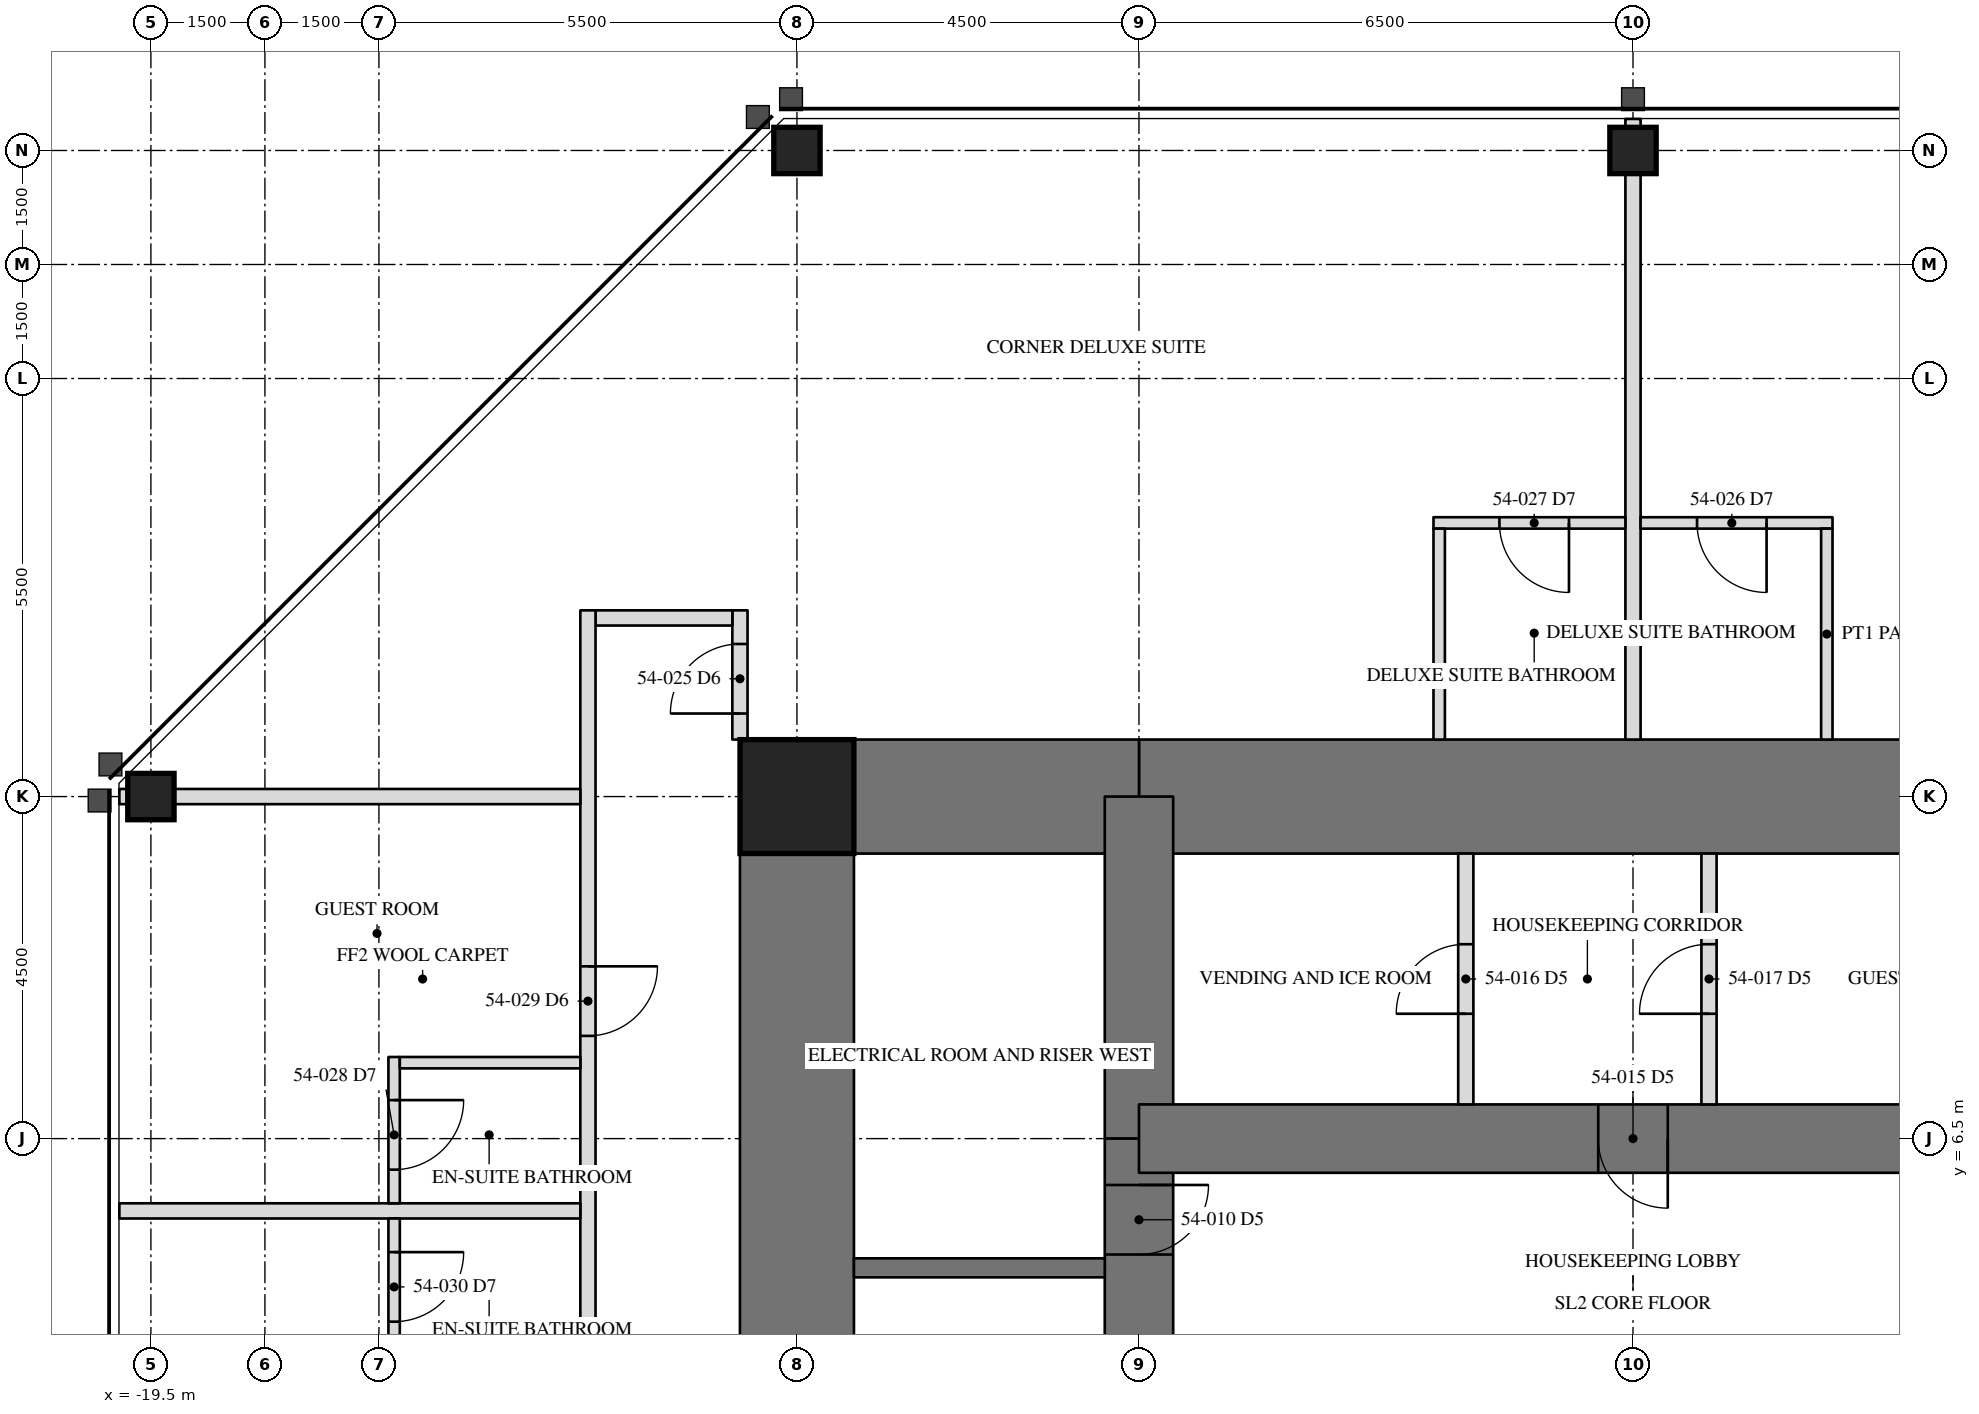
"""IFC4 building model, lengths in metres.
Left out: names, types, materials, properties, quantities, classifications, styles, units other than length and angle.
Written with IfcOpenShell. Run it as: python <this file> out.ifc"""

import sys

from ifc_helpers import new_model, si_unit, direction, frame, frame_2d, origin, origin_2d, place, context, subcontext, project, spatial, rectangle, hollow_rectangle, extrude, element, fill, save


model = new_model("IFC4")
c1 = context("Model", 3, precision=1e-05, world=origin(), true_north=direction((0.0, 1.0)))
c2 = subcontext(c1, "Body", "Model", "MODEL_VIEW")
j1 = project(units=[si_unit("LENGTHUNIT", "METRE"), si_unit("PLANEANGLEUNIT", "RADIAN")], contexts=[c1])
p1 = place(None, origin())
s1 = spatial("IfcSite", under=j1, at=p1, CompositionType="ELEMENT")
p2 = place(p1, origin())
s2 = spatial("IfcBuilding", under=s1, at=p2, CompositionType="ELEMENT")
p3 = place(p2, frame((0.0, 0.0, 225.7)))
s3 = spatial("IfcBuildingStorey", under=s2, at=p3, CompositionType="ELEMENT", Elevation=225.7)
for number, where, z_axis, x_axis in (
    (1, (0.0, 19.5, 0.0), (0.0, 0.0, 1.0), (1.0, 0.0, 0.0)),
    (2, (-11.0, 19.5, 0.0), (0.0, 0.0, 1.0), (1.0, 0.0, 0.0)),
    (3, (-19.5, 11.0, 0.0), (0.0, 0.0, 1.0), (0.0, 1.0, 0.0)),
):
    element("IfcColumn", number, at=place(p3, frame(where, z_axis=z_axis, x_axis=x_axis)), inside=s3, PredefinedType="COLUMN", context=c2, shape_type="SweptSolid", body=[
        extrude(hollow_rectangle(XDim=0.61, YDim=0.61, WallThickness=0.076, at=origin_2d()), origin(), (0.0, 0.0, 1.0), 3.5),
    ])
p4 = place(p3, frame((-11.0, 11.0, 0.0), z_axis=(0.0, 0.0, 1.0), x_axis=(0.0, -1.0, 0.0)))
e4 = element("IfcWall", 4, at=p4, inside=s3, PredefinedType="SHEAR", context=c2, shape_type="SweptSolid", body=[
    extrude(rectangle(XDim=22.0, YDim=1.5, at=frame_2d((11.0, 0.0))), origin(), (0.0, 0.0, 1.0), 3.5),
])
p5 = place(p4, frame((15.393, 0.0, 0.0)))
e5 = element("IfcOpeningElement", 5, at=p5, cuts=e4, PredefinedType="OPENING", context=c2, shape_type="SweptSolid", body=[
    extrude(rectangle(XDim=0.915, YDim=2.134, at=frame_2d((0.458, 1.067))), frame((0.0, 0.76, 0.0), z_axis=(0.0, -1.0, 0.0), x_axis=(1.0, 0.0, 0.0)), (0.0, 0.0, 1.0), 1.52),
])
p6 = place(p3, frame((6.5, 11.0, 0.0), z_axis=(0.0, 0.0, 1.0), x_axis=(-1.0, 0.0, 0.0)))
e6 = element("IfcWall", 6, at=p6, inside=s3, PredefinedType="SHEAR", context=c2, shape_type="SweptSolid", body=[
    extrude(rectangle(XDim=13.0, YDim=1.5, at=frame_2d((6.5, 0.0))), origin(), (0.0, 0.0, 1.0), 3.5),
])
p7 = place(p3, frame((-6.5, 11.0, 0.0), z_axis=(0.0, 0.0, 1.0), x_axis=(-1.0, 0.0, 0.0)))
e7 = element("IfcWall", 7, at=p7, inside=s3, PredefinedType="SHEAR", context=c2, shape_type="SweptSolid", body=[
    extrude(rectangle(XDim=4.5, YDim=1.5, at=frame_2d((2.25, 0.0))), origin(), (0.0, 0.0, 1.0), 3.5),
])
p8 = place(p3, frame((-6.5, 11.0, 0.0), z_axis=(0.0, 0.0, 1.0), x_axis=(0.0, -1.0, 0.0)))
e8 = element("IfcWall", 8, at=p8, inside=s3, PredefinedType="SHEAR", context=c2, shape_type="SweptSolid", body=[
    extrude(rectangle(XDim=4.5, YDim=0.9, at=frame_2d((2.25, 0.0))), origin(), (0.0, 0.0, 1.0), 3.5),
])
p9 = place(p3, frame((-6.5, 6.5, 0.0), z_axis=(0.0, 0.0, 1.0), x_axis=(0.0, -1.0, 0.0)))
e9 = element("IfcWall", 9, at=p9, inside=s3, PredefinedType="SHEAR", context=c2, shape_type="SweptSolid", body=[
    extrude(rectangle(XDim=13.0, YDim=0.9, at=frame_2d((6.5, 0.0))), origin(), (0.0, 0.0, 1.0), 3.5),
])
p10 = place(p9, frame((10.893, 0.0, 0.0)))
e10 = element("IfcOpeningElement", 10, at=p10, cuts=e9, PredefinedType="OPENING", context=c2, shape_type="SweptSolid", body=[
    extrude(rectangle(XDim=0.915, YDim=2.134, at=frame_2d((0.458, 1.067))), frame((0.0, 0.46, 0.0), z_axis=(0.0, -1.0, 0.0), x_axis=(1.0, 0.0, 0.0)), (0.0, 0.0, 1.0), 0.92),
])
p11 = place(p9, frame((0.61, 0.0, 0.0)))
e11 = element("IfcOpeningElement", 11, at=p11, cuts=e9, PredefinedType="OPENING", context=c2, shape_type="SweptSolid", body=[
    extrude(rectangle(XDim=0.915, YDim=2.134, at=frame_2d((0.458, 1.067))), frame((0.0, 0.46, 0.0), z_axis=(0.0, -1.0, 0.0), x_axis=(1.0, 0.0, 0.0)), (0.0, 0.0, 1.0), 0.92),
])
p12 = place(p3, frame((6.5, 6.5, 0.0), z_axis=(0.0, 0.0, 1.0), x_axis=(-1.0, 0.0, 0.0)))
e12 = element("IfcWall", 12, at=p12, inside=s3, PredefinedType="SHEAR", context=c2, shape_type="SweptSolid", body=[
    extrude(rectangle(XDim=13.0, YDim=0.9, at=frame_2d((6.5, 0.0))), origin(), (0.0, 0.0, 1.0), 3.5),
])
p13 = place(p12, frame((6.042, 0.0, 0.0)))
e13 = element("IfcOpeningElement", 13, at=p13, cuts=e12, PredefinedType="OPENING", context=c2, shape_type="SweptSolid", body=[
    extrude(rectangle(XDim=0.915, YDim=2.134, at=frame_2d((0.458, 1.067))), frame((0.0, 0.46, 0.0), z_axis=(0.0, -1.0, 0.0), x_axis=(1.0, 0.0, 0.0)), (0.0, 0.0, 1.0), 0.92),
])
p14 = place(p3, frame((-11.0, 11.0, 0.0), z_axis=(0.0, 0.0, 1.0), x_axis=(1.0, 0.0, 0.0)))
e14 = element("IfcColumn", 14, at=p14, inside=s3, PredefinedType="COLUMN", context=c2, shape_type="SweptSolid", body=[
    extrude(hollow_rectangle(XDim=1.499, YDim=1.499, WallThickness=0.102, at=origin_2d()), origin(), (0.0, 0.0, 1.0), 3.5),
])
p15 = place(p3, frame((-6.95, 4.8, 0.0), z_axis=(0.0, 0.0, 1.0), x_axis=(-1.0, 0.0, 0.0)))
e15 = element("IfcWall", 15, at=p15, inside=s3, PredefinedType="SOLIDWALL", context=c2, shape_type="SweptSolid", body=[
    extrude(rectangle(XDim=3.3, YDim=0.25, at=frame_2d((1.65, 0.0))), origin(), (0.0, 0.0, 1.0), 3.31),
])
p16 = place(p3, frame((-2.2, 6.95, 0.0), z_axis=(0.0, 0.0, 1.0), x_axis=(0.0, 1.0, 0.0)))
e16 = element("IfcWall", 16, at=p16, inside=s3, PredefinedType="PARTITIONING", context=c2, shape_type="SweptSolid", body=[
    extrude(rectangle(XDim=3.3, YDim=0.2, at=frame_2d((1.65, 0.0))), origin(), (0.0, 0.0, 1.0), 3.31),
])
p17 = place(p16, frame((1.192, 0.0, 0.0)))
e17 = element("IfcOpeningElement", 17, at=p17, cuts=e16, PredefinedType="OPENING", context=c2, shape_type="SweptSolid", body=[
    extrude(rectangle(XDim=0.915, YDim=2.134, at=frame_2d((0.458, 1.067))), frame((0.0, 0.11, 0.0), z_axis=(0.0, -1.0, 0.0), x_axis=(1.0, 0.0, 0.0)), (0.0, 0.0, 1.0), 0.22),
])
p18 = place(p3, frame((1.0, 6.95, 0.0), z_axis=(0.0, 0.0, 1.0), x_axis=(0.0, 1.0, 0.0)))
e18 = element("IfcWall", 18, at=p18, inside=s3, PredefinedType="PARTITIONING", context=c2, shape_type="SweptSolid", body=[
    extrude(rectangle(XDim=3.3, YDim=0.2, at=frame_2d((1.65, 0.0))), origin(), (0.0, 0.0, 1.0), 3.31),
])
p19 = place(p18, frame((1.192, 0.0, 0.0)))
e19 = element("IfcOpeningElement", 19, at=p19, cuts=e18, PredefinedType="OPENING", context=c2, shape_type="SweptSolid", body=[
    extrude(rectangle(XDim=0.915, YDim=2.134, at=frame_2d((0.458, 1.067))), frame((0.0, 0.11, 0.0), z_axis=(0.0, -1.0, 0.0), x_axis=(1.0, 0.0, 0.0)), (0.0, 0.0, 1.0), 0.22),
])
p20 = place(p3, frame((-11.75, 11.75, 0.0), z_axis=(0.0, 0.0, 1.0), x_axis=(0.0, 1.0, 0.0)))
e20 = element("IfcWall", 20, at=p20, inside=s3, PredefinedType="PARTITIONING", context=c2, shape_type="SweptSolid", body=[
    extrude(rectangle(XDim=1.7, YDim=0.2, at=frame_2d((0.85, 0.0))), origin(), (0.0, 0.0, 1.0), 3.31),
])
p21 = place(p20, frame((0.343, 0.0, 0.0)))
e21 = element("IfcOpeningElement", 21, at=p21, cuts=e20, PredefinedType="OPENING", context=c2, shape_type="SweptSolid", body=[
    extrude(rectangle(XDim=0.915, YDim=2.134, at=frame_2d((0.458, 1.067))), frame((0.0, 0.11, 0.0), z_axis=(0.0, -1.0, 0.0), x_axis=(1.0, 0.0, 0.0)), (0.0, 0.0, 1.0), 0.22),
])
p22 = place(p3, frame((-11.85, 13.35, 0.0), z_axis=(0.0, 0.0, 1.0), x_axis=(-1.0, 0.0, 0.0)))
e22 = element("IfcWall", 22, at=p22, inside=s3, PredefinedType="PARTITIONING", context=c2, shape_type="SweptSolid", body=[
    extrude(rectangle(XDim=1.8, YDim=0.2, at=frame_2d((0.9, 0.0))), origin(), (0.0, 0.0, 1.0), 3.31),
])
p23 = place(p3, frame((-13.75, 13.45, 0.0), z_axis=(0.0, 0.0, 1.0), x_axis=(0.0, -1.0, 0.0)))
e23 = element("IfcWall", 23, at=p23, inside=s3, PredefinedType="PARTITIONING", context=c2, shape_type="SweptSolid", body=[
    extrude(rectangle(XDim=26.7, YDim=0.2, at=frame_2d((13.35, 0.0))), origin(), (0.0, 0.0, 1.0), 3.31),
])
p24 = place(p23, frame((4.684, 0.0, 0.0)))
e24 = element("IfcOpeningElement", 24, at=p24, cuts=e23, PredefinedType="OPENING", context=c2, shape_type="SweptSolid", body=[
    extrude(rectangle(XDim=0.915, YDim=2.134, at=frame_2d((0.458, 1.067))), frame((0.0, 0.11, 0.0), z_axis=(0.0, -1.0, 0.0), x_axis=(1.0, 0.0, 0.0)), (0.0, 0.0, 1.0), 0.22),
])
p25 = place(p23, frame((10.204, 0.0, 0.0)))
e25 = element("IfcOpeningElement", 25, at=p25, cuts=e23, PredefinedType="OPENING", context=c2, shape_type="SweptSolid", body=[
    extrude(rectangle(XDim=0.915, YDim=2.134, at=frame_2d((0.458, 1.067))), frame((0.0, 0.11, 0.0), z_axis=(0.0, -1.0, 0.0), x_axis=(1.0, 0.0, 0.0)), (0.0, 0.0, 1.0), 0.22),
])
p26 = place(p23, frame((15.846, 0.0, 0.0)))
e26 = element("IfcOpeningElement", 26, at=p26, cuts=e23, PredefinedType="OPENING", context=c2, shape_type="SweptSolid", body=[
    extrude(rectangle(XDim=0.915, YDim=2.134, at=frame_2d((0.458, 1.067))), frame((0.0, 0.11, 0.0), z_axis=(0.0, -1.0, 0.0), x_axis=(1.0, 0.0, 0.0)), (0.0, 0.0, 1.0), 0.22),
])
p27 = place(p23, frame((21.366, 0.0, 0.0)))
e27 = element("IfcOpeningElement", 27, at=p27, cuts=e23, PredefinedType="OPENING", context=c2, shape_type="SweptSolid", body=[
    extrude(rectangle(XDim=0.915, YDim=2.134, at=frame_2d((0.458, 1.067))), frame((0.0, 0.11, 0.0), z_axis=(0.0, -1.0, 0.0), x_axis=(1.0, 0.0, 0.0)), (0.0, 0.0, 1.0), 0.22),
])
p28 = place(p3, frame((0.0, 11.75, 0.0), z_axis=(0.0, 0.0, 1.0), x_axis=(0.0, 1.0, 0.0)))
e28 = element("IfcWall", 28, at=p28, inside=s3, PredefinedType="PARTITIONING", context=c2, shape_type="SweptSolid", body=[
    extrude(rectangle(XDim=8.165, YDim=0.2, at=frame_2d((4.083, 0.0))), origin(), (0.0, 0.0, 1.0), 2.802),
])
p29 = place(p3, frame((2.625, 14.6, 0.0), z_axis=(0.0, 0.0, 1.0), x_axis=(-1.0, 0.0, 0.0)))
e29 = element("IfcWall", 29, at=p29, inside=s3, PredefinedType="PARTITIONING", context=c2, shape_type="SweptSolid", body=[
    extrude(rectangle(XDim=2.525, YDim=0.15, at=frame_2d((1.262, 0.0))), origin(), (0.0, 0.0, 1.0), 3.31),
])
p30 = place(p29, frame((0.867, 0.0, 0.0)))
e30 = element("IfcOpeningElement", 30, at=p30, cuts=e29, PredefinedType="OPENING", context=c2, shape_type="SweptSolid", body=[
    extrude(rectangle(XDim=0.915, YDim=2.032, at=frame_2d((0.458, 1.016))), frame((0.0, 0.085, 0.0), z_axis=(0.0, -1.0, 0.0), x_axis=(1.0, 0.0, 0.0)), (0.0, 0.0, 1.0), 0.17),
])
p31 = place(p3, frame((2.55, 11.75, 0.0), z_axis=(0.0, 0.0, 1.0), x_axis=(0.0, 1.0, 0.0)))
e31 = element("IfcWall", 31, at=p31, inside=s3, PredefinedType="PARTITIONING", context=c2, shape_type="SweptSolid", body=[
    extrude(rectangle(XDim=2.775, YDim=0.15, at=frame_2d((1.387, 0.0))), origin(), (0.0, 0.0, 1.0), 3.31),
])
p32 = place(p3, frame((-0.1, 14.6, 0.0), z_axis=(0.0, 0.0, 1.0), x_axis=(-1.0, 0.0, 0.0)))
e32 = element("IfcWall", 32, at=p32, inside=s3, PredefinedType="PARTITIONING", context=c2, shape_type="SweptSolid", body=[
    extrude(rectangle(XDim=2.525, YDim=0.15, at=frame_2d((1.262, 0.0))), origin(), (0.0, 0.0, 1.0), 3.31),
])
p33 = place(p32, frame((0.742, 0.0, 0.0)))
e33 = element("IfcOpeningElement", 33, at=p33, cuts=e32, PredefinedType="OPENING", context=c2, shape_type="SweptSolid", body=[
    extrude(rectangle(XDim=0.915, YDim=2.032, at=frame_2d((0.458, 1.016))), frame((0.0, 0.085, 0.0), z_axis=(0.0, -1.0, 0.0), x_axis=(1.0, 0.0, 0.0)), (0.0, 0.0, 1.0), 0.17),
])
p34 = place(p3, frame((-2.55, 11.75, 0.0), z_axis=(0.0, 0.0, 1.0), x_axis=(0.0, 1.0, 0.0)))
e34 = element("IfcWall", 34, at=p34, inside=s3, PredefinedType="PARTITIONING", context=c2, shape_type="SweptSolid", body=[
    extrude(rectangle(XDim=2.775, YDim=0.15, at=frame_2d((1.387, 0.0))), origin(), (0.0, 0.0, 1.0), 3.31),
])
p35 = place(p3, frame((-13.85, 11.0, 0.0), z_axis=(0.0, 0.0, 1.0), x_axis=(-1.0, 0.0, 0.0)))
e35 = element("IfcWall", 35, at=p35, inside=s3, PredefinedType="PARTITIONING", context=c2, shape_type="SweptSolid", body=[
    extrude(rectangle(XDim=6.065, YDim=0.2, at=frame_2d((3.032, 0.0))), origin(), (0.0, 0.0, 1.0), 2.802),
])
p36 = place(p3, frame((-13.85, 5.549, 0.0), z_axis=(0.0, 0.0, 1.0), x_axis=(-1.0, 0.0, 0.0)))
e36 = element("IfcWall", 36, at=p36, inside=s3, PredefinedType="PARTITIONING", context=c2, shape_type="SweptSolid", body=[
    extrude(rectangle(XDim=6.065, YDim=0.2, at=frame_2d((3.032, 0.0))), origin(), (0.0, 0.0, 1.0), 3.31),
])
p37 = place(p3, frame((-16.3, 7.574, 0.0), z_axis=(0.0, 0.0, 1.0), x_axis=(0.0, -1.0, 0.0)))
e37 = element("IfcWall", 37, at=p37, inside=s3, PredefinedType="PARTITIONING", context=c2, shape_type="SweptSolid", body=[
    extrude(rectangle(XDim=1.925, YDim=0.15, at=frame_2d((0.962, 0.0))), origin(), (0.0, 0.0, 1.0), 3.31),
])
p38 = place(p37, frame((0.567, 0.0, 0.0)))
e38 = element("IfcOpeningElement", 38, at=p38, cuts=e37, PredefinedType="OPENING", context=c2, shape_type="SweptSolid", body=[
    extrude(rectangle(XDim=0.915, YDim=2.032, at=frame_2d((0.458, 1.016))), frame((0.0, 0.085, 0.0), z_axis=(0.0, -1.0, 0.0), x_axis=(1.0, 0.0, 0.0)), (0.0, 0.0, 1.0), 0.17),
])
p39 = place(p3, frame((-13.85, 7.499, 0.0), z_axis=(0.0, 0.0, 1.0), x_axis=(-1.0, 0.0, 0.0)))
e39 = element("IfcWall", 39, at=p39, inside=s3, PredefinedType="PARTITIONING", context=c2, shape_type="SweptSolid", body=[
    extrude(rectangle(XDim=2.375, YDim=0.15, at=frame_2d((1.188, 0.0))), origin(), (0.0, 0.0, 1.0), 3.31),
])
p40 = place(p3, frame((-16.3, 5.449, 0.0), z_axis=(0.0, 0.0, 1.0), x_axis=(0.0, -1.0, 0.0)))
e40 = element("IfcWall", 40, at=p40, inside=s3, PredefinedType="PARTITIONING", context=c2, shape_type="SweptSolid", body=[
    extrude(rectangle(XDim=1.925, YDim=0.15, at=frame_2d((0.962, 0.0))), origin(), (0.0, 0.0, 1.0), 3.31),
])
p41 = place(p40, frame((0.442, 0.0, 0.0)))
e41 = element("IfcOpeningElement", 41, at=p41, cuts=e40, PredefinedType="OPENING", context=c2, shape_type="SweptSolid", body=[
    extrude(rectangle(XDim=0.915, YDim=2.032, at=frame_2d((0.458, 1.016))), frame((0.0, 0.085, 0.0), z_axis=(0.0, -1.0, 0.0), x_axis=(1.0, 0.0, 0.0)), (0.0, 0.0, 1.0), 0.17),
])
p42 = place(p11, origin())
e42 = element("IfcDoor", 42, at=p42, inside=s3, OperationType="SINGLE_SWING_RIGHT", PredefinedType="DOOR", context=c2, shape_type="SweptSolid", body=[
    extrude(rectangle(XDim=0.915, YDim=2.134, at=frame_2d((0.458, 1.067))), frame((0.0, -0.375, 0.0), z_axis=(0.0, -1.0, 0.0), x_axis=(1.0, 0.0, 0.0)), (0.0, 0.0, 1.0), 0.05),
])
fill(e11, e42)
p43 = place(p13, origin())
e43 = element("IfcDoor", 43, at=p43, inside=s3, OperationType="SINGLE_SWING_RIGHT", PredefinedType="DOOR", context=c2, shape_type="SweptSolid", body=[
    extrude(rectangle(XDim=0.915, YDim=2.134, at=frame_2d((0.458, 1.067))), frame((0.0, -0.375, 0.0), z_axis=(0.0, -1.0, 0.0), x_axis=(1.0, 0.0, 0.0)), (0.0, 0.0, 1.0), 0.05),
])
fill(e13, e43)
p44 = place(p17, origin())
e44 = element("IfcDoor", 44, at=p44, inside=s3, OperationType="SINGLE_SWING_RIGHT", PredefinedType="DOOR", context=c2, shape_type="SweptSolid", body=[
    extrude(rectangle(XDim=0.915, YDim=2.134, at=frame_2d((0.458, 1.067))), frame((0.0, 0.025, 0.0), z_axis=(0.0, -1.0, 0.0), x_axis=(1.0, 0.0, 0.0)), (0.0, 0.0, 1.0), 0.05),
])
fill(e17, e44)
p45 = place(p19, origin())
e45 = element("IfcDoor", 45, at=p45, inside=s3, OperationType="SINGLE_SWING_RIGHT", PredefinedType="DOOR", context=c2, shape_type="SweptSolid", body=[
    extrude(rectangle(XDim=0.915, YDim=2.134, at=frame_2d((0.458, 1.067))), frame((0.0, 0.025, 0.0), z_axis=(0.0, -1.0, 0.0), x_axis=(1.0, 0.0, 0.0)), (0.0, 0.0, 1.0), 0.05),
])
fill(e19, e45)
p46 = place(p21, origin())
e46 = element("IfcDoor", 46, at=p46, inside=s3, OperationType="SINGLE_SWING_LEFT", PredefinedType="DOOR", context=c2, shape_type="SweptSolid", body=[
    extrude(rectangle(XDim=0.915, YDim=2.134, at=frame_2d((0.458, 1.067))), frame((0.0, 0.025, 0.0), z_axis=(0.0, -1.0, 0.0), x_axis=(1.0, 0.0, 0.0)), (0.0, 0.0, 1.0), 0.05),
])
fill(e21, e46)
p47 = place(p30, origin())
e47 = element("IfcDoor", 47, at=p47, inside=s3, OperationType="SINGLE_SWING_LEFT", PredefinedType="DOOR", context=c2, shape_type="SweptSolid", body=[
    extrude(rectangle(XDim=0.915, YDim=2.032, at=frame_2d((0.458, 1.016))), frame((0.0, 0.025, 0.0), z_axis=(0.0, -1.0, 0.0), x_axis=(1.0, 0.0, 0.0)), (0.0, 0.0, 1.0), 0.05),
])
fill(e30, e47)
p48 = place(p33, origin())
e48 = element("IfcDoor", 48, at=p48, inside=s3, OperationType="SINGLE_SWING_LEFT", PredefinedType="DOOR", context=c2, shape_type="SweptSolid", body=[
    extrude(rectangle(XDim=0.915, YDim=2.032, at=frame_2d((0.458, 1.016))), frame((0.0, 0.025, 0.0), z_axis=(0.0, -1.0, 0.0), x_axis=(1.0, 0.0, 0.0)), (0.0, 0.0, 1.0), 0.05),
])
fill(e33, e48)
p49 = place(p38, origin())
e49 = element("IfcDoor", 49, at=p49, inside=s3, OperationType="SINGLE_SWING_LEFT", PredefinedType="DOOR", context=c2, shape_type="SweptSolid", body=[
    extrude(rectangle(XDim=0.915, YDim=2.032, at=frame_2d((0.458, 1.016))), frame((0.0, 0.025, 0.0), z_axis=(0.0, -1.0, 0.0), x_axis=(1.0, 0.0, 0.0)), (0.0, 0.0, 1.0), 0.05),
])
fill(e38, e49)
p50 = place(p24, origin())
e50 = element("IfcDoor", 50, at=p50, inside=s3, OperationType="SINGLE_SWING_LEFT", PredefinedType="DOOR", context=c2, shape_type="SweptSolid", body=[
    extrude(rectangle(XDim=0.915, YDim=2.134, at=frame_2d((0.458, 1.067))), frame((0.0, 0.025, 0.0), z_axis=(0.0, -1.0, 0.0), x_axis=(1.0, 0.0, 0.0)), (0.0, 0.0, 1.0), 0.05),
])
fill(e24, e50)
p51 = place(p41, origin())
e51 = element("IfcDoor", 51, at=p51, inside=s3, OperationType="SINGLE_SWING_LEFT", PredefinedType="DOOR", context=c2, shape_type="SweptSolid", body=[
    extrude(rectangle(XDim=0.915, YDim=2.032, at=frame_2d((0.458, 1.016))), frame((0.0, 0.025, 0.0), z_axis=(0.0, -1.0, 0.0), x_axis=(1.0, 0.0, 0.0)), (0.0, 0.0, 1.0), 0.05),
])
fill(e41, e51)
save(model, sys.argv[1])
